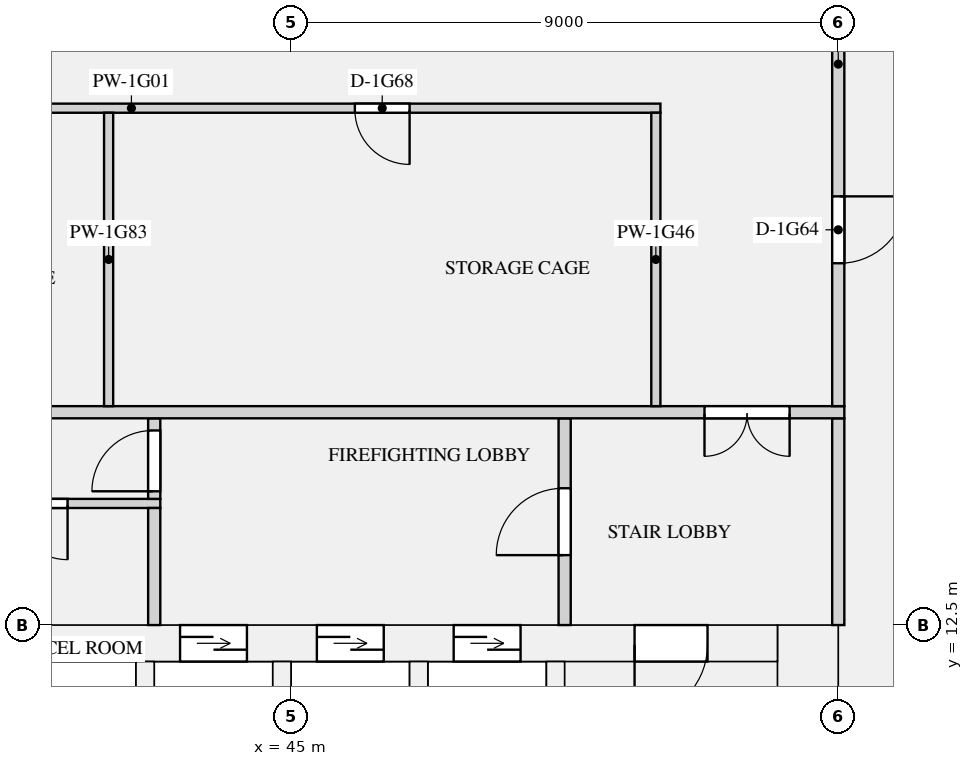
"""IFC4 building model, lengths in metres.
Left out: names, types, materials, properties, quantities, classifications, styles, units other than length and angle.
Written with IfcOpenShell. Run it as: python <this file> out.ifc"""

import sys

from ifc_helpers import new_model, si_unit, direction, frame, frame_2d, origin, place, context, subcontext, project, spatial, rectangle, extrude, element, fill, save


model = new_model("IFC4")
c1 = context("Model", 3, precision=1e-05, world=origin(), true_north=direction((0.0, 1.0)))
c2 = subcontext(c1, "Body", "Model", "MODEL_VIEW")
j1 = project(units=[si_unit("LENGTHUNIT", "METRE"), si_unit("PLANEANGLEUNIT", "RADIAN")], contexts=[c1])
p1 = place(None, origin())
s1 = spatial("IfcSite", under=j1, at=p1, CompositionType="ELEMENT")
p2 = place(p1, origin())
s2 = spatial("IfcBuilding", under=s1, at=p2, CompositionType="ELEMENT")
p3 = place(p2, frame((0.0, 0.0, 69.9)))
s3 = spatial("IfcBuildingStorey", under=s2, at=p3, CompositionType="ELEMENT", Elevation=69.9)
p4 = place(p3, frame((53.5, 0.0, 0.0), z_axis=(0.0, 0.0, 1.0), x_axis=(0.0, 1.0, 0.0)))
e1 = element("IfcWall", 1, at=p4, inside=s3, PredefinedType="SHEAR", context=c2, shape_type="SweptSolid", body=[
    extrude(rectangle(XDim=12.5, YDim=1.0, at=frame_2d((6.25, 0.0))), origin(), (0.0, 0.0, 1.0), 3.15),
])
p5 = place(p3, frame((19.0, 12.2, 0.0), z_axis=(0.0, 0.0, 1.0), x_axis=(1.0, 0.0, 0.0)))
e2 = element("IfcWall", 2, at=p5, inside=s3, PredefinedType="SHEAR", context=c2, shape_type="SweptSolid", body=[
    extrude(rectangle(XDim=34.0, YDim=0.6, at=frame_2d((17.0, 0.0))), origin(), (0.0, 0.0, 1.0), 3.15),
])
p6 = place(p5, frame((4.475, 0.0, 0.0)))
e3 = element("IfcOpeningElement", 3, at=p6, cuts=e2, PredefinedType="OPENING", context=c2, shape_type="SweptSolid", body=[
    extrude(rectangle(XDim=1.2, YDim=2.1, at=frame_2d((0.6, 1.05))), frame((0.0, 0.31, 0.0), z_axis=(0.0, -1.0, 0.0), x_axis=(1.0, 0.0, 0.0)), (0.0, 0.0, 1.0), 0.62),
])
p7 = place(p5, frame((7.325, 0.0, 0.0)))
e4 = element("IfcOpeningElement", 4, at=p7, cuts=e2, PredefinedType="OPENING", context=c2, shape_type="SweptSolid", body=[
    extrude(rectangle(XDim=1.2, YDim=2.1, at=frame_2d((0.6, 1.05))), frame((0.0, 0.31, 0.0), z_axis=(0.0, -1.0, 0.0), x_axis=(1.0, 0.0, 0.0)), (0.0, 0.0, 1.0), 0.62),
])
p8 = place(p5, frame((10.175, 0.0, 0.0)))
e5 = element("IfcOpeningElement", 5, at=p8, cuts=e2, PredefinedType="OPENING", context=c2, shape_type="SweptSolid", body=[
    extrude(rectangle(XDim=1.2, YDim=2.1, at=frame_2d((0.6, 1.05))), frame((0.0, 0.31, 0.0), z_axis=(0.0, -1.0, 0.0), x_axis=(1.0, 0.0, 0.0)), (0.0, 0.0, 1.0), 0.62),
])
p9 = place(p5, frame((13.025, 0.0, 0.0)))
e6 = element("IfcOpeningElement", 6, at=p9, cuts=e2, PredefinedType="OPENING", context=c2, shape_type="SweptSolid", body=[
    extrude(rectangle(XDim=1.2, YDim=2.1, at=frame_2d((0.6, 1.05))), frame((0.0, 0.31, 0.0), z_axis=(0.0, -1.0, 0.0), x_axis=(1.0, 0.0, 0.0)), (0.0, 0.0, 1.0), 0.62),
])
p10 = place(p5, frame((15.875, 0.0, 0.0)))
e7 = element("IfcOpeningElement", 7, at=p10, cuts=e2, PredefinedType="OPENING", context=c2, shape_type="SweptSolid", body=[
    extrude(rectangle(XDim=1.2, YDim=2.1, at=frame_2d((0.6, 1.05))), frame((0.0, 0.31, 0.0), z_axis=(0.0, -1.0, 0.0), x_axis=(1.0, 0.0, 0.0)), (0.0, 0.0, 1.0), 0.62),
])
p11 = place(p5, frame((24.175, 0.0, 0.0)))
e8 = element("IfcOpeningElement", 8, at=p11, cuts=e2, PredefinedType="OPENING", context=c2, shape_type="SweptSolid", body=[
    extrude(rectangle(XDim=1.1, YDim=2.1, at=frame_2d((0.55, 1.05))), frame((0.0, 0.31, 0.0), z_axis=(0.0, -1.0, 0.0), x_axis=(1.0, 0.0, 0.0)), (0.0, 0.0, 1.0), 0.62),
])
p12 = place(p5, frame((26.425, 0.0, 0.0)))
e9 = element("IfcOpeningElement", 9, at=p12, cuts=e2, PredefinedType="OPENING", context=c2, shape_type="SweptSolid", body=[
    extrude(rectangle(XDim=1.1, YDim=2.1, at=frame_2d((0.55, 1.05))), frame((0.0, 0.31, 0.0), z_axis=(0.0, -1.0, 0.0), x_axis=(1.0, 0.0, 0.0)), (0.0, 0.0, 1.0), 0.62),
])
p13 = place(p5, frame((28.675, 0.0, 0.0)))
e10 = element("IfcOpeningElement", 10, at=p13, cuts=e2, PredefinedType="OPENING", context=c2, shape_type="SweptSolid", body=[
    extrude(rectangle(XDim=1.1, YDim=2.1, at=frame_2d((0.55, 1.05))), frame((0.0, 0.31, 0.0), z_axis=(0.0, -1.0, 0.0), x_axis=(1.0, 0.0, 0.0)), (0.0, 0.0, 1.0), 0.62),
])
p14 = place(p5, frame((1.15, 0.0, 0.0)))
e11 = element("IfcOpeningElement", 11, at=p14, cuts=e2, PredefinedType="OPENING", context=c2, shape_type="SweptSolid", body=[
    extrude(rectangle(XDim=1.2, YDim=2.1, at=frame_2d((0.6, 1.05))), frame((0.0, 0.31, 0.0), z_axis=(0.0, -1.0, 0.0), x_axis=(1.0, 0.0, 0.0)), (0.0, 0.0, 1.0), 0.62),
])
p15 = place(p5, frame((31.65, 0.0, 0.0)))
e12 = element("IfcOpeningElement", 12, at=p15, cuts=e2, PredefinedType="OPENING", context=c2, shape_type="SweptSolid", body=[
    extrude(rectangle(XDim=1.2, YDim=2.1, at=frame_2d((0.6, 1.05))), frame((0.0, 0.31, 0.0), z_axis=(0.0, -1.0, 0.0), x_axis=(1.0, 0.0, 0.0)), (0.0, 0.0, 1.0), 0.62),
])
for number, where, z_axis, x_axis in (
    (13, (42.6, 8.25, 0.0), (0.0, 0.0, 1.0), (0.0, 1.0, 0.0)),
    (14, (44.85, 8.25, 0.0), (0.0, 0.0, 1.0), (0.0, 1.0, 0.0)),
    (15, (47.1, 8.25, 0.0), (0.0, 0.0, 1.0), (0.0, 1.0, 0.0)),
    (16, (49.35, 8.25, 0.0), (0.0, 0.0, 1.0), (0.0, 1.0, 0.0)),
):
    element("IfcWall", number, at=place(p3, frame(where, z_axis=z_axis, x_axis=x_axis)), inside=s3, PredefinedType="SHEAR", context=c2, shape_type="SweptSolid", body=[
        extrude(rectangle(XDim=3.65, YDim=0.3, at=frame_2d((1.825, 0.0))), origin(), (0.0, 0.0, 1.0), 3.15),
    ])
p16 = place(p3, frame((38.925, 14.5, 0.0), z_axis=(0.0, 0.0, 1.0), x_axis=(1.0, 0.0, 0.0)))
e17 = element("IfcWall", 17, at=p16, inside=s3, PredefinedType="PARTITIONING", context=c2, shape_type="SweptSolid", body=[
    extrude(rectangle(XDim=3.925, YDim=0.15, at=frame_2d((1.962, 0.0))), origin(), (0.0, 0.0, 1.0), 2.65),
])
p17 = place(p16, frame((1.5, 0.0, 0.0)))
e18 = element("IfcOpeningElement", 18, at=p17, cuts=e17, PredefinedType="OPENING", context=c2, shape_type="SweptSolid", body=[
    extrude(rectangle(XDim=0.9, YDim=2.1, at=frame_2d((0.45, 1.05))), frame((0.0, 0.085, 0.0), z_axis=(0.0, -1.0, 0.0), x_axis=(1.0, 0.0, 0.0)), (0.0, 0.0, 1.0), 0.17),
])
p18 = place(p3, frame((42.75, 12.5, 0.0), z_axis=(0.0, 0.0, 1.0), x_axis=(0.0, 1.0, 0.0)))
e19 = element("IfcWall", 19, at=p18, inside=s3, PredefinedType="PARTITIONING", context=c2, shape_type="SweptSolid", body=[
    extrude(rectangle(XDim=1.925, YDim=0.2, at=frame_2d((0.962, 0.0))), origin(), (0.0, 0.0, 1.0), 2.65),
])
p19 = place(p3, frame((49.5, 12.5, 0.0), z_axis=(0.0, 0.0, 1.0), x_axis=(0.0, 1.0, 0.0)))
e20 = element("IfcWall", 20, at=p19, inside=s3, PredefinedType="PARTITIONING", context=c2, shape_type="SweptSolid", body=[
    extrude(rectangle(XDim=3.4, YDim=0.2, at=frame_2d((1.7, 0.0))), origin(), (0.0, 0.0, 1.0), 2.65),
])
p20 = place(p19, frame((1.15, 0.0, 0.0)))
e21 = element("IfcOpeningElement", 21, at=p20, cuts=e20, PredefinedType="OPENING", context=c2, shape_type="SweptSolid", body=[
    extrude(rectangle(XDim=1.1, YDim=2.1, at=frame_2d((0.55, 1.05))), frame((0.0, 0.11, 0.0), z_axis=(0.0, -1.0, 0.0), x_axis=(1.0, 0.0, 0.0)), (0.0, 0.0, 1.0), 0.22),
])
p21 = place(p3, frame((54.0, 12.5, 0.0), z_axis=(0.0, 0.0, 1.0), x_axis=(0.0, 1.0, 0.0)))
e22 = element("IfcWall", 22, at=p21, inside=s3, PredefinedType="PARTITIONING", context=c2, shape_type="SweptSolid", body=[
    extrude(rectangle(XDim=3.4, YDim=0.2, at=frame_2d((1.7, 0.0))), origin(), (0.0, 0.0, 1.0), 2.65),
])
p22 = place(p3, frame((42.75, 14.575, 0.0), z_axis=(0.0, 0.0, 1.0), x_axis=(0.0, 1.0, 0.0)))
e23 = element("IfcWall", 23, at=p22, inside=s3, PredefinedType="PARTITIONING", context=c2, shape_type="SweptSolid", body=[
    extrude(rectangle(XDim=1.325, YDim=0.2, at=frame_2d((0.663, 0.0))), origin(), (0.0, 0.0, 1.0), 2.65),
])
p23 = place(p22, frame((0.125, 0.0, 0.0)))
e24 = element("IfcOpeningElement", 24, at=p23, cuts=e23, PredefinedType="OPENING", context=c2, shape_type="SweptSolid", body=[
    extrude(rectangle(XDim=1.0, YDim=2.1, at=frame_2d((0.5, 1.05))), frame((0.0, 0.11, 0.0), z_axis=(0.0, -1.0, 0.0), x_axis=(1.0, 0.0, 0.0)), (0.0, 0.0, 1.0), 0.22),
])
p24 = place(p3, frame((20.925, 21.0, 0.0), z_axis=(0.0, 0.0, 1.0), x_axis=(1.0, 0.0, 0.0)))
e25 = element("IfcWall", 25, at=p24, inside=s3, PredefinedType="PARTITIONING", context=c2, shape_type="SweptSolid", body=[
    extrude(rectangle(XDim=30.15, YDim=0.15, at=frame_2d((15.075, 0.0))), origin(), (0.0, 0.0, 1.0), 2.65),
])
p25 = place(p24, frame((4.125, 0.0, 0.0)))
e26 = element("IfcOpeningElement", 26, at=p25, cuts=e25, PredefinedType="OPENING", context=c2, shape_type="SweptSolid", body=[
    extrude(rectangle(XDim=0.9, YDim=2.1, at=frame_2d((0.45, 1.05))), frame((0.0, 0.085, 0.0), z_axis=(0.0, -1.0, 0.0), x_axis=(1.0, 0.0, 0.0)), (0.0, 0.0, 1.0), 0.17),
])
p26 = place(p24, frame((10.875, 0.0, 0.0)))
e27 = element("IfcOpeningElement", 27, at=p26, cuts=e25, PredefinedType="OPENING", context=c2, shape_type="SweptSolid", body=[
    extrude(rectangle(XDim=0.9, YDim=2.1, at=frame_2d((0.45, 1.05))), frame((0.0, 0.085, 0.0), z_axis=(0.0, -1.0, 0.0), x_axis=(1.0, 0.0, 0.0)), (0.0, 0.0, 1.0), 0.17),
])
p27 = place(p24, frame((16.875, 0.0, 0.0)))
e28 = element("IfcOpeningElement", 28, at=p27, cuts=e25, PredefinedType="OPENING", context=c2, shape_type="SweptSolid", body=[
    extrude(rectangle(XDim=0.9, YDim=2.1, at=frame_2d((0.45, 1.05))), frame((0.0, 0.085, 0.0), z_axis=(0.0, -1.0, 0.0), x_axis=(1.0, 0.0, 0.0)), (0.0, 0.0, 1.0), 0.17),
])
p28 = place(p24, frame((25.125, 0.0, 0.0)))
e29 = element("IfcOpeningElement", 29, at=p28, cuts=e25, PredefinedType="OPENING", context=c2, shape_type="SweptSolid", body=[
    extrude(rectangle(XDim=0.9, YDim=2.1, at=frame_2d((0.45, 1.05))), frame((0.0, 0.085, 0.0), z_axis=(0.0, -1.0, 0.0), x_axis=(1.0, 0.0, 0.0)), (0.0, 0.0, 1.0), 0.17),
])
p29 = place(p3, frame((17.9, 16.0, 0.0), z_axis=(0.0, 0.0, 1.0), x_axis=(1.0, 0.0, 0.0)))
e30 = element("IfcWall", 30, at=p29, inside=s3, PredefinedType="PARTITIONING", context=c2, shape_type="SweptSolid", body=[
    extrude(rectangle(XDim=36.2, YDim=0.2, at=frame_2d((18.1, 0.0))), origin(), (0.0, 0.0, 1.0), 2.65),
])
p30 = place(p29, frame((0.9, 0.0, 0.0)))
e31 = element("IfcOpeningElement", 31, at=p30, cuts=e30, PredefinedType="OPENING", context=c2, shape_type="SweptSolid", body=[
    extrude(rectangle(XDim=1.4, YDim=2.1, at=frame_2d((0.7, 1.05))), frame((0.0, 0.11, 0.0), z_axis=(0.0, -1.0, 0.0), x_axis=(1.0, 0.0, 0.0)), (0.0, 0.0, 1.0), 0.22),
])
p31 = place(p29, frame((33.9, 0.0, 0.0)))
e32 = element("IfcOpeningElement", 32, at=p31, cuts=e30, PredefinedType="OPENING", context=c2, shape_type="SweptSolid", body=[
    extrude(rectangle(XDim=1.4, YDim=2.1, at=frame_2d((0.7, 1.05))), frame((0.0, 0.11, 0.0), z_axis=(0.0, -1.0, 0.0), x_axis=(1.0, 0.0, 0.0)), (0.0, 0.0, 1.0), 0.22),
])
p32 = place(p3, frame((54.0, 16.1, 0.0), z_axis=(0.0, 0.0, 1.0), x_axis=(0.0, 1.0, 0.0)))
e33 = element("IfcWall", 33, at=p32, inside=s3, PredefinedType="PARTITIONING", context=c2, shape_type="SweptSolid", body=[
    extrude(rectangle(XDim=7.8, YDim=0.2, at=frame_2d((3.9, 0.0))), origin(), (0.0, 0.0, 1.0), 2.65),
])
p33 = place(p32, frame((2.35, 0.0, 0.0)))
e34 = element("IfcOpeningElement", 34, at=p33, cuts=e33, PredefinedType="OPENING", context=c2, shape_type="SweptSolid", body=[
    extrude(rectangle(XDim=1.1, YDim=2.1, at=frame_2d((0.55, 1.05))), frame((0.0, 0.11, 0.0), z_axis=(0.0, -1.0, 0.0), x_axis=(1.0, 0.0, 0.0)), (0.0, 0.0, 1.0), 0.22),
])
for number, where, z_axis, x_axis in (
    (35, (51.0, 16.1, 0.0), (0.0, 0.0, 1.0), (0.0, 1.0, 0.0)),
    (36, (42.0, 16.1, 0.0), (0.0, 0.0, 1.0), (0.0, 1.0, 0.0)),
):
    element("IfcWall", number, at=place(p3, frame(where, z_axis=z_axis, x_axis=x_axis)), inside=s3, PredefinedType="PARTITIONING", context=c2, shape_type="SweptSolid", body=[
        extrude(rectangle(XDim=4.825, YDim=0.15, at=frame_2d((2.413, 0.0))), origin(), (0.0, 0.0, 1.0), 2.65),
    ])
p34 = place(p11, origin())
e37 = element("IfcDoor", 37, at=p34, inside=s3, OperationType="DOUBLE_DOOR_SLIDING", PredefinedType="DOOR", context=c2, shape_type="SweptSolid", body=[
    extrude(rectangle(XDim=1.1, YDim=2.1, at=frame_2d((0.55, 1.05))), frame((0.0, 0.025, 0.0), z_axis=(0.0, -1.0, 0.0), x_axis=(1.0, 0.0, 0.0)), (0.0, 0.0, 1.0), 0.05),
])
fill(e8, e37)
p35 = place(p12, origin())
e38 = element("IfcDoor", 38, at=p35, inside=s3, OperationType="DOUBLE_DOOR_SLIDING", PredefinedType="DOOR", context=c2, shape_type="SweptSolid", body=[
    extrude(rectangle(XDim=1.1, YDim=2.1, at=frame_2d((0.55, 1.05))), frame((0.0, 0.025, 0.0), z_axis=(0.0, -1.0, 0.0), x_axis=(1.0, 0.0, 0.0)), (0.0, 0.0, 1.0), 0.05),
])
fill(e9, e38)
p36 = place(p13, origin())
e39 = element("IfcDoor", 39, at=p36, inside=s3, OperationType="DOUBLE_DOOR_SLIDING", PredefinedType="DOOR", context=c2, shape_type="SweptSolid", body=[
    extrude(rectangle(XDim=1.1, YDim=2.1, at=frame_2d((0.55, 1.05))), frame((0.0, 0.025, 0.0), z_axis=(0.0, -1.0, 0.0), x_axis=(1.0, 0.0, 0.0)), (0.0, 0.0, 1.0), 0.05),
])
fill(e10, e39)
p37 = place(p17, frame((0.9, 0.0, 0.0), z_axis=(0.0, 0.0, 1.0), x_axis=(-1.0, 0.0, 0.0)))
e40 = element("IfcDoor", 40, at=p37, inside=s3, OperationType="SINGLE_SWING_LEFT", PredefinedType="DOOR", context=c2, shape_type="SweptSolid", body=[
    extrude(rectangle(XDim=0.9, YDim=2.1, at=frame_2d((0.45, 1.05))), frame((0.0, 0.025, 0.0), z_axis=(0.0, -1.0, 0.0), x_axis=(1.0, 0.0, 0.0)), (0.0, 0.0, 1.0), 0.05),
])
fill(e18, e40)
p38 = place(p15, frame((1.2, 0.0, 0.0), z_axis=(0.0, 0.0, 1.0), x_axis=(-1.0, 0.0, 0.0)))
e41 = element("IfcDoor", 41, at=p38, inside=s3, OperationType="SINGLE_SWING_RIGHT", PredefinedType="DOOR", context=c2, shape_type="SweptSolid", body=[
    extrude(rectangle(XDim=1.2, YDim=2.1, at=frame_2d((0.6, 1.05))), frame((0.0, 0.025, 0.0), z_axis=(0.0, -1.0, 0.0), x_axis=(1.0, 0.0, 0.0)), (0.0, 0.0, 1.0), 0.05),
])
fill(e12, e41)
p39 = place(p23, origin())
e42 = element("IfcDoor", 42, at=p39, inside=s3, OperationType="SINGLE_SWING_LEFT", PredefinedType="DOOR", context=c2, shape_type="SweptSolid", body=[
    extrude(rectangle(XDim=1.0, YDim=2.1, at=frame_2d((0.5, 1.05))), frame((0.0, 0.025, 0.0), z_axis=(0.0, -1.0, 0.0), x_axis=(1.0, 0.0, 0.0)), (0.0, 0.0, 1.0), 0.05),
])
fill(e24, e42)
p40 = place(p20, origin())
e43 = element("IfcDoor", 43, at=p40, inside=s3, OperationType="SINGLE_SWING_LEFT", PredefinedType="DOOR", context=c2, shape_type="SweptSolid", body=[
    extrude(rectangle(XDim=1.1, YDim=2.1, at=frame_2d((0.55, 1.05))), frame((0.0, 0.025, 0.0), z_axis=(0.0, -1.0, 0.0), x_axis=(1.0, 0.0, 0.0)), (0.0, 0.0, 1.0), 0.05),
])
fill(e21, e43)
p41 = place(p31, frame((1.4, 0.0, 0.0), z_axis=(0.0, 0.0, 1.0), x_axis=(-1.0, 0.0, 0.0)))
e44 = element("IfcDoor", 44, at=p41, inside=s3, OperationType="DOUBLE_DOOR_SINGLE_SWING", PredefinedType="DOOR", context=c2, shape_type="SweptSolid", body=[
    extrude(rectangle(XDim=1.4, YDim=2.1, at=frame_2d((0.7, 1.05))), frame((0.0, 0.025, 0.0), z_axis=(0.0, -1.0, 0.0), x_axis=(1.0, 0.0, 0.0)), (0.0, 0.0, 1.0), 0.05),
])
fill(e32, e44)
p42 = place(p33, frame((1.1, 0.0, 0.0), z_axis=(0.0, 0.0, 1.0), x_axis=(-1.0, 0.0, 0.0)))
e45 = element("IfcDoor", 45, at=p42, inside=s3, OperationType="SINGLE_SWING_LEFT", PredefinedType="DOOR", context=c2, shape_type="SweptSolid", body=[
    extrude(rectangle(XDim=1.1, YDim=2.1, at=frame_2d((0.55, 1.05))), frame((0.0, 0.025, 0.0), z_axis=(0.0, -1.0, 0.0), x_axis=(1.0, 0.0, 0.0)), (0.0, 0.0, 1.0), 0.05),
])
fill(e34, e45)
p43 = place(p28, frame((0.9, 0.0, 0.0), z_axis=(0.0, 0.0, 1.0), x_axis=(-1.0, 0.0, 0.0)))
e46 = element("IfcDoor", 46, at=p43, inside=s3, OperationType="SINGLE_SWING_LEFT", PredefinedType="DOOR", context=c2, shape_type="SweptSolid", body=[
    extrude(rectangle(XDim=0.9, YDim=2.1, at=frame_2d((0.45, 1.05))), frame((0.0, 0.025, 0.0), z_axis=(0.0, -1.0, 0.0), x_axis=(1.0, 0.0, 0.0)), (0.0, 0.0, 1.0), 0.05),
])
fill(e29, e46)
save(model, sys.argv[1])
